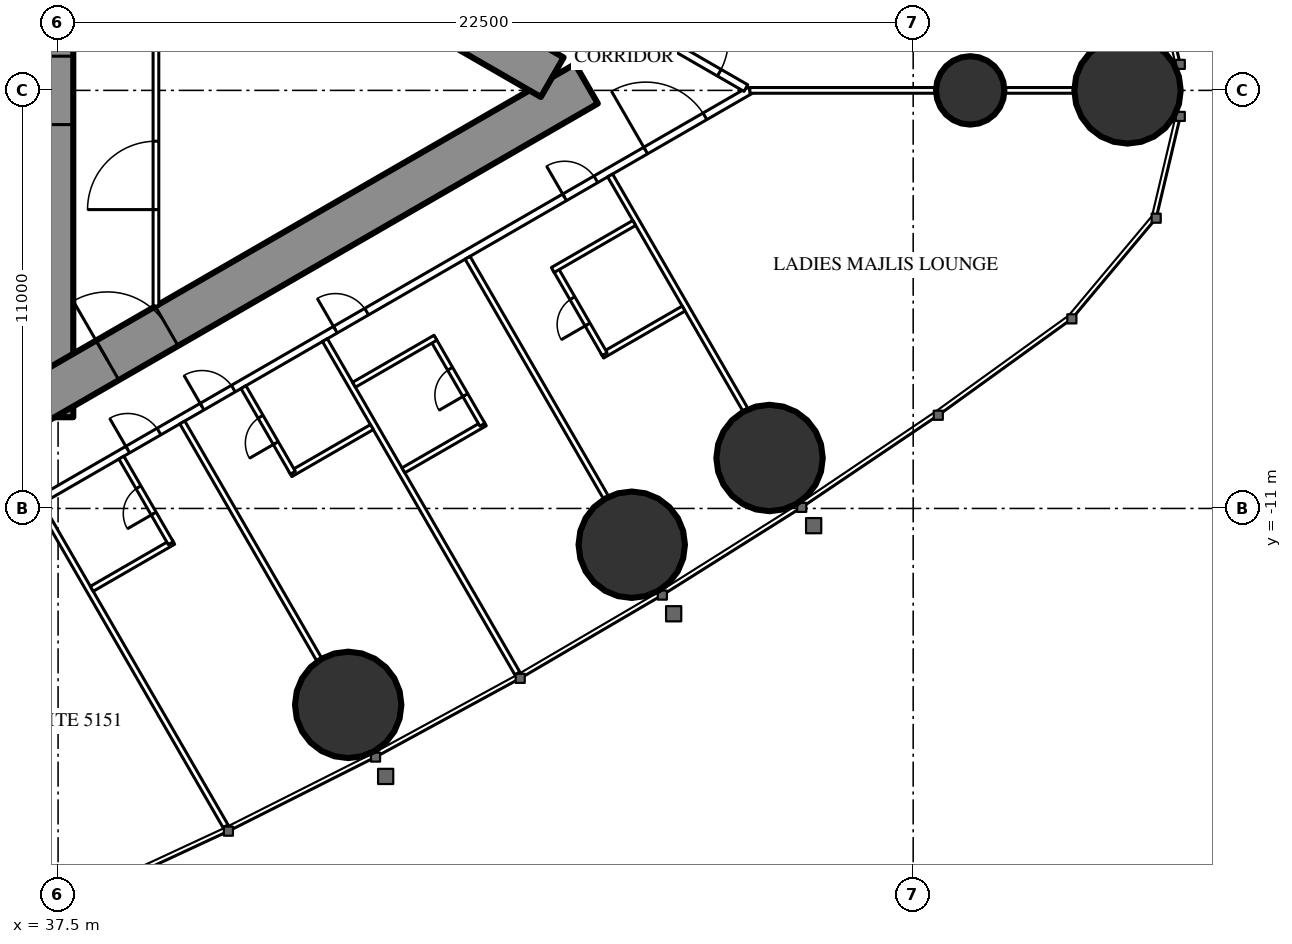
"""IFC4 building model, lengths in metres.
Left out: names, types, materials, properties, quantities, classifications, styles, units other than length and angle.
Written with IfcOpenShell. Run it as: python <this file> out.ifc"""

import sys

from ifc_helpers import new_model, si_unit, direction, frame, frame_2d, origin, origin_2d, place, context, subcontext, project, spatial, rectangle, circle, extrude, element, fill, save


model = new_model("IFC4")
c1 = context("Model", 3, precision=1e-05, world=origin(), true_north=direction((0.0, 1.0)))
c2 = subcontext(c1, "Body", "Model", "MODEL_VIEW")
j1 = project(units=[si_unit("LENGTHUNIT", "METRE"), si_unit("PLANEANGLEUNIT", "RADIAN")], contexts=[c1])
p1 = place(None, origin())
s1 = spatial("IfcSite", under=j1, at=p1, CompositionType="ELEMENT")
p2 = place(p1, origin())
s2 = spatial("IfcBuilding", under=s1, at=p2, CompositionType="ELEMENT")
p3 = place(p2, frame((0.0, 0.0, 191.3)))
s3 = spatial("IfcBuildingStorey", under=s2, at=p3, CompositionType="ELEMENT", Elevation=191.3)
for number, where, z_axis, x_axis in (
    (1, (65.64, 0.0, 0.0), (0.0, 0.0, 1.0), (1.0, 0.0, 0.0)),
    (2, (45.134, -16.168, 0.0), (0.0, 0.0, 1.0), (1.0, 0.0, 0.0)),
    (3, (52.594, -11.955, 0.0), (0.0, 0.0, 1.0), (1.0, 0.0, 0.0)),
    (4, (56.221, -9.672, 0.0), (0.0, 0.0, 1.0), (1.0, 0.0, 0.0)),
):
    element("IfcColumn", number, at=place(p3, frame(where, z_axis=z_axis, x_axis=x_axis)), inside=s3, PredefinedType="COLUMN", context=c2, shape_type="SweptSolid", body=[
        extrude(circle(Radius=1.4, at=origin_2d()), origin(), (0.0, 0.0, 1.0), 3.5),
    ])
p4 = place(p3, frame((61.5, 0.0, 0.0), z_axis=(0.0, 0.0, 1.0), x_axis=(1.0, 0.0, 0.0)))
e5 = element("IfcColumn", 5, at=p4, inside=s3, PredefinedType="COLUMN", context=c2, shape_type="SweptSolid", body=[
    extrude(circle(Radius=0.9, at=origin_2d()), origin(), (0.0, 0.0, 1.0), 3.5),
])
p5 = place(p3, frame((37.3, -8.6, 0.0), z_axis=(0.0, 0.0, 1.0), x_axis=(0.0, 1.0, 0.0)))
e6 = element("IfcWall", 6, at=p5, inside=s3, PredefinedType="SHEAR", context=c2, shape_type="SweptSolid", body=[
    extrude(rectangle(XDim=17.2, YDim=1.2, at=frame_2d((8.6, 0.0))), origin(), (0.0, 0.0, 1.0), 3.5),
])
p6 = place(p5, frame((7.7, 0.0, 0.0)))
e7 = element("IfcOpeningElement", 7, at=p6, cuts=e6, PredefinedType="OPENING", context=c2, shape_type="SweptSolid", body=[
    extrude(rectangle(XDim=1.8, YDim=2.2, at=frame_2d((0.9, 1.1))), frame((0.0, 0.61, 0.0), z_axis=(0.0, -1.0, 0.0), x_axis=(1.0, 0.0, 0.0)), (0.0, 0.0, 1.0), 1.22),
])
p7 = place(p3, frame((27.2, -13.8, 0.0), z_axis=(0.0, 0.0, 1.0), x_axis=(0.866027159892, 0.499996958321, 0.0)))
e8 = element("IfcWall", 8, at=p7, inside=s3, PredefinedType="SHEAR", context=c2, shape_type="SweptSolid", body=[
    extrude(rectangle(XDim=27.947, YDim=1.2, at=frame_2d((13.973, 0.0))), origin(), (0.0, 0.0, 1.0), 3.5),
])
p8 = place(p7, frame((4.6, 0.0, 0.0)))
e9 = element("IfcOpeningElement", 9, at=p8, cuts=e8, PredefinedType="OPENING", context=c2, shape_type="SweptSolid", body=[
    extrude(rectangle(XDim=1.0, YDim=2.2, at=frame_2d((0.5, 1.1))), frame((0.0, 0.61, 0.0), z_axis=(0.0, -1.0, 0.0), x_axis=(1.0, 0.0, 0.0)), (0.0, 0.0, 1.0), 1.22),
])
p9 = place(p7, frame((13.395, 0.0, 0.0)))
e10 = element("IfcOpeningElement", 10, at=p9, cuts=e8, PredefinedType="OPENING", context=c2, shape_type="SweptSolid", body=[
    extrude(rectangle(XDim=1.8, YDim=2.2, at=frame_2d((0.9, 1.1))), frame((0.0, 0.61, 0.0), z_axis=(0.0, -1.0, 0.0), x_axis=(1.0, 0.0, 0.0)), (0.0, 0.0, 1.0), 1.22),
])
p10 = place(p3, frame((27.2, 13.8, 0.0), z_axis=(0.0, 0.0, 1.0), x_axis=(0.866024515034, -0.500001539357, 0.0)))
e11 = element("IfcWall", 11, at=p10, inside=s3, PredefinedType="SHEAR", context=c2, shape_type="SweptSolid", body=[
    extrude(rectangle(XDim=26.907, YDim=1.2, at=frame_2d((13.454, 0.0))), origin(), (0.0, 0.0, 1.0), 3.5),
])
p11 = place(p10, frame((4.6, 0.0, 0.0)))
e12 = element("IfcOpeningElement", 12, at=p11, cuts=e11, PredefinedType="OPENING", context=c2, shape_type="SweptSolid", body=[
    extrude(rectangle(XDim=1.0, YDim=2.2, at=frame_2d((0.5, 1.1))), frame((0.0, 0.61, 0.0), z_axis=(0.0, -1.0, 0.0), x_axis=(1.0, 0.0, 0.0)), (0.0, 0.0, 1.0), 1.22),
])
p12 = place(p10, frame((13.395, 0.0, 0.0)))
e13 = element("IfcOpeningElement", 13, at=p12, cuts=e11, PredefinedType="OPENING", context=c2, shape_type="SweptSolid", body=[
    extrude(rectangle(XDim=1.8, YDim=2.2, at=frame_2d((0.9, 1.1))), frame((0.0, 0.61, 0.0), z_axis=(0.0, -1.0, 0.0), x_axis=(1.0, 0.0, 0.0)), (0.0, 0.0, 1.0), 1.22),
])
p13 = place(p3, frame((27.959, -16.017, 0.0), z_axis=(0.0, 0.0, 1.0), x_axis=(0.866024151371, 0.500002169237, 0.0)))
e14 = element("IfcWall", 14, at=p13, inside=s3, PredefinedType="PARTITIONING", context=c2, shape_type="SweptSolid", body=[
    extrude(rectangle(XDim=32.034, YDim=0.2, at=frame_2d((16.017, 0.0))), origin(), (0.0, 0.0, 1.0), 3.25),
])
p14 = place(p13, frame((0.6, 0.0, 0.0)))
e15 = element("IfcOpeningElement", 15, at=p14, cuts=e14, PredefinedType="OPENING", context=c2, shape_type="SweptSolid", body=[
    extrude(rectangle(XDim=0.95, YDim=2.2, at=frame_2d((0.475, 1.1))), frame((0.0, 0.11, 0.0), z_axis=(0.0, -1.0, 0.0), x_axis=(1.0, 0.0, 0.0)), (0.0, 0.0, 1.0), 0.22),
])
p15 = place(p13, frame((13.132, 0.0, 0.0)))
e16 = element("IfcOpeningElement", 16, at=p15, cuts=e14, PredefinedType="OPENING", context=c2, shape_type="SweptSolid", body=[
    extrude(rectangle(XDim=0.95, YDim=2.2, at=frame_2d((0.475, 1.1))), frame((0.0, 0.11, 0.0), z_axis=(0.0, -1.0, 0.0), x_axis=(1.0, 0.0, 0.0)), (0.0, 0.0, 1.0), 0.22),
])
p16 = place(p13, frame((15.391, 0.0, 0.0)))
e17 = element("IfcOpeningElement", 17, at=p16, cuts=e14, PredefinedType="OPENING", context=c2, shape_type="SweptSolid", body=[
    extrude(rectangle(XDim=0.95, YDim=2.2, at=frame_2d((0.475, 1.1))), frame((0.0, 0.11, 0.0), z_axis=(0.0, -1.0, 0.0), x_axis=(1.0, 0.0, 0.0)), (0.0, 0.0, 1.0), 0.22),
])
p17 = place(p13, frame((19.441, 0.0, 0.0)))
e18 = element("IfcOpeningElement", 18, at=p17, cuts=e14, PredefinedType="OPENING", context=c2, shape_type="SweptSolid", body=[
    extrude(rectangle(XDim=0.95, YDim=2.2, at=frame_2d((0.475, 1.1))), frame((0.0, 0.11, 0.0), z_axis=(0.0, -1.0, 0.0), x_axis=(1.0, 0.0, 0.0)), (0.0, 0.0, 1.0), 0.22),
])
p18 = place(p13, frame((26.406, 0.0, 0.0)))
e19 = element("IfcOpeningElement", 19, at=p18, cuts=e14, PredefinedType="OPENING", context=c2, shape_type="SweptSolid", body=[
    extrude(rectangle(XDim=0.95, YDim=2.2, at=frame_2d((0.475, 1.1))), frame((0.0, 0.11, 0.0), z_axis=(0.0, -1.0, 0.0), x_axis=(1.0, 0.0, 0.0)), (0.0, 0.0, 1.0), 0.22),
])
p19 = place(p13, frame((28.87, 0.0, 0.0)))
e20 = element("IfcOpeningElement", 20, at=p19, cuts=e14, PredefinedType="OPENING", context=c2, shape_type="SweptSolid", body=[
    extrude(rectangle(XDim=1.8, YDim=2.2, at=frame_2d((0.9, 1.1))), frame((0.0, 0.11, 0.0), z_axis=(0.0, -1.0, 0.0), x_axis=(1.0, 0.0, 0.0)), (0.0, 0.0, 1.0), 0.22),
])
p20 = place(p3, frame((37.022, -10.9, 0.0), z_axis=(0.0, 0.0, 1.0), x_axis=(0.499998620953, -0.866026199976, 0.0)))
e21 = element("IfcWall", 21, at=p20, inside=s3, PredefinedType="PARTITIONING", context=c2, shape_type="SweptSolid", body=[
    extrude(rectangle(XDim=9.77, YDim=0.15, at=frame_2d((4.885, 0.0))), origin(), (0.0, 0.0, 1.0), 3.25),
])
p21 = place(p3, frame((40.769, -8.737, 0.0), z_axis=(0.0, 0.0, 1.0), x_axis=(0.500013115284, -0.866017831539, 0.0)))
e22 = element("IfcWall", 22, at=p21, inside=s3, PredefinedType="PARTITIONING", context=c2, shape_type="SweptSolid", body=[
    extrude(rectangle(XDim=7.198, YDim=0.15, at=frame_2d((3.599, 0.0))), origin(), (0.0, 0.0, 1.0), 2.3),
])
p22 = place(p3, frame((44.521, -6.571, 0.0), z_axis=(0.0, 0.0, 1.0), x_axis=(0.500010457486, -0.866019366068, 0.0)))
e23 = element("IfcWall", 23, at=p22, inside=s3, PredefinedType="PARTITIONING", context=c2, shape_type="SweptSolid", body=[
    extrude(rectangle(XDim=10.126, YDim=0.15, at=frame_2d((5.063, 0.0))), origin(), (0.0, 0.0, 1.0), 3.25),
])
p23 = place(p3, frame((48.275, -4.404, 0.0), z_axis=(0.0, 0.0, 1.0), x_axis=(0.500006004368, -0.866021937133, 0.0)))
e24 = element("IfcWall", 24, at=p23, inside=s3, PredefinedType="PARTITIONING", context=c2, shape_type="SweptSolid", body=[
    extrude(rectangle(XDim=7.279, YDim=0.15, at=frame_2d((3.64, 0.0))), origin(), (0.0, 0.0, 1.0), 2.3),
])
p24 = place(p3, frame((52.025, -2.238, 0.0), z_axis=(0.0, 0.0, 1.0), x_axis=(0.499983785035, -0.866034765296, 0.0)))
e25 = element("IfcWall", 25, at=p24, inside=s3, PredefinedType="PARTITIONING", context=c2, shape_type="SweptSolid", body=[
    extrude(rectangle(XDim=7.116, YDim=0.15, at=frame_2d((3.558, 0.0))), origin(), (0.0, 0.0, 1.0), 2.3),
])
p25 = place(p3, frame((55.702, 0.0, 0.0), z_axis=(0.0, 0.0, 1.0), x_axis=(1.0, 0.0, 0.0)))
e26 = element("IfcWall", 26, at=p25, inside=s3, PredefinedType="PARTITIONING", context=c2, shape_type="SweptSolid", body=[
    extrude(rectangle(XDim=8.518, YDim=0.15, at=frame_2d((4.259, 0.0))), origin(), (0.0, 0.0, 1.0), 2.3),
])
p26 = place(p3, frame((52.639, 1.769, 0.0), z_axis=(0.0, 0.0, 1.0), x_axis=(0.866027340901, -0.4999966448, 0.0)))
e27 = element("IfcWall", 27, at=p26, inside=s3, PredefinedType="PARTITIONING", context=c2, shape_type="SweptSolid", body=[
    extrude(rectangle(XDim=3.417, YDim=0.2, at=frame_2d((1.708, 0.0))), origin(), (0.0, 0.0, 1.0), 3.25),
])
p27 = place(p26, frame((0.809, 0.0, 0.0)))
e28 = element("IfcOpeningElement", 28, at=p27, cuts=e27, PredefinedType="OPENING", context=c2, shape_type="SweptSolid", body=[
    extrude(rectangle(XDim=1.8, YDim=2.2, at=frame_2d((0.9, 1.1))), frame((0.0, 0.11, 0.0), z_axis=(0.0, -1.0, 0.0), x_axis=(1.0, 0.0, 0.0)), (0.0, 0.0, 1.0), 0.22),
])
p28 = place(p3, frame((38.387, -13.115, 0.0), z_axis=(0.0, 0.0, 1.0), x_axis=(0.866073894602, 0.499916002032, 0.0)))
e29 = element("IfcWall", 29, at=p28, inside=s3, PredefinedType="PARTITIONING", context=c2, shape_type="SweptSolid", body=[
    extrude(rectangle(XDim=2.475, YDim=0.15, at=frame_2d((1.238, 0.0))), origin(), (0.0, 0.0, 1.0), 3.25),
])
p29 = place(p3, frame((39.166, -9.663, 0.0), z_axis=(0.0, 0.0, 1.0), x_axis=(0.500006934395, -0.866021400173, 0.0)))
e30 = element("IfcWall", 30, at=p29, inside=s3, PredefinedType="PARTITIONING", context=c2, shape_type="SweptSolid", body=[
    extrude(rectangle(XDim=2.6, YDim=0.15, at=frame_2d((1.3, 0.0))), origin(), (0.0, 0.0, 1.0), 3.25),
])
p30 = place(p29, frame((0.9, 0.0, 0.0)))
e31 = element("IfcOpeningElement", 31, at=p30, cuts=e30, PredefinedType="OPENING", context=c2, shape_type="SweptSolid", body=[
    extrude(rectangle(XDim=0.8, YDim=2.2, at=frame_2d((0.4, 1.1))), frame((0.0, 0.085, 0.0), z_axis=(0.0, -1.0, 0.0), x_axis=(1.0, 0.0, 0.0)), (0.0, 0.0, 1.0), 0.17),
])
p31 = place(p3, frame((43.613, -10.097, 0.0), z_axis=(0.0, 0.0, 1.0), x_axis=(0.866031185235, 0.4999899861, 0.0)))
e32 = element("IfcWall", 32, at=p31, inside=s3, PredefinedType="PARTITIONING", context=c2, shape_type="SweptSolid", body=[
    extrude(rectangle(XDim=2.475, YDim=0.15, at=frame_2d((1.238, 0.0))), origin(), (0.0, 0.0, 1.0), 3.25),
])
p32 = place(p3, frame((42.378, -7.808, 0.0), z_axis=(0.0, 0.0, 1.0), x_axis=(0.500006934395, -0.866021400173, 0.0)))
e33 = element("IfcWall", 33, at=p32, inside=s3, PredefinedType="PARTITIONING", context=c2, shape_type="SweptSolid", body=[
    extrude(rectangle(XDim=2.6, YDim=0.15, at=frame_2d((1.3, 0.0))), origin(), (0.0, 0.0, 1.0), 3.25),
])
p33 = place(p32, frame((0.9, 0.0, 0.0)))
e34 = element("IfcOpeningElement", 34, at=p33, cuts=e33, PredefinedType="OPENING", context=c2, shape_type="SweptSolid", body=[
    extrude(rectangle(XDim=0.8, YDim=2.2, at=frame_2d((0.4, 1.1))), frame((0.0, 0.085, 0.0), z_axis=(0.0, -1.0, 0.0), x_axis=(1.0, 0.0, 0.0)), (0.0, 0.0, 1.0), 0.17),
])
p34 = place(p3, frame((46.586, -9.997, 0.0), z_axis=(0.0, 0.0, 1.0), x_axis=(0.866006523861, 0.500032699561, 0.0)))
e35 = element("IfcWall", 35, at=p34, inside=s3, PredefinedType="PARTITIONING", context=c2, shape_type="SweptSolid", body=[
    extrude(rectangle(XDim=2.475, YDim=0.15, at=frame_2d((1.237, 0.0))), origin(), (0.0, 0.0, 1.0), 3.25),
])
p35 = place(p3, frame((47.365, -6.546, 0.0), z_axis=(0.0, 0.0, 1.0), x_axis=(0.500006934395, -0.866021400173, 0.0)))
e36 = element("IfcWall", 36, at=p35, inside=s3, PredefinedType="PARTITIONING", context=c2, shape_type="SweptSolid", body=[
    extrude(rectangle(XDim=2.6, YDim=0.15, at=frame_2d((1.3, 0.0))), origin(), (0.0, 0.0, 1.0), 3.25),
])
p36 = place(p35, frame((0.9, 0.0, 0.0)))
e37 = element("IfcOpeningElement", 37, at=p36, cuts=e36, PredefinedType="OPENING", context=c2, shape_type="SweptSolid", body=[
    extrude(rectangle(XDim=0.8, YDim=2.2, at=frame_2d((0.4, 1.1))), frame((0.0, 0.085, 0.0), z_axis=(0.0, -1.0, 0.0), x_axis=(1.0, 0.0, 0.0)), (0.0, 0.0, 1.0), 0.17),
])
for number, where, z_axis, x_axis in (
    (38, (45.286, -7.746, 0.0), (0.0, 0.0, 1.0), (0.866, 0.5, 0.0)),
    (39, (51.817, -6.978, 0.0), (0.0, 0.0, 1.0), (0.866, 0.5, 0.0)),
):
    element("IfcWall", number, at=place(p3, frame(where, z_axis=z_axis, x_axis=x_axis)), inside=s3, PredefinedType="PARTITIONING", context=c2, shape_type="SweptSolid", body=[
        extrude(rectangle(XDim=2.475, YDim=0.15, at=frame_2d((1.237, 0.0))), origin(), (0.0, 0.0, 1.0), 3.25),
    ])
p37 = place(p3, frame((50.582, -4.688, 0.0), z_axis=(0.0, 0.0, 1.0), x_axis=(0.500006934395, -0.866021400173, 0.0)))
e40 = element("IfcWall", 40, at=p37, inside=s3, PredefinedType="PARTITIONING", context=c2, shape_type="SweptSolid", body=[
    extrude(rectangle(XDim=2.6, YDim=0.15, at=frame_2d((1.3, 0.0))), origin(), (0.0, 0.0, 1.0), 3.25),
])
p38 = place(p37, frame((0.9, 0.0, 0.0)))
e41 = element("IfcOpeningElement", 41, at=p38, cuts=e40, PredefinedType="OPENING", context=c2, shape_type="SweptSolid", body=[
    extrude(rectangle(XDim=0.8, YDim=2.2, at=frame_2d((0.4, 1.1))), frame((0.0, 0.085, 0.0), z_axis=(0.0, -1.0, 0.0), x_axis=(1.0, 0.0, 0.0)), (0.0, 0.0, 1.0), 0.17),
])
p39 = place(p3, frame((50.517, -4.726, 0.0), z_axis=(0.0, 0.0, 1.0), x_axis=(0.866031185235, 0.4999899861, 0.0)))
e42 = element("IfcWall", 42, at=p39, inside=s3, PredefinedType="PARTITIONING", context=c2, shape_type="SweptSolid", body=[
    extrude(rectangle(XDim=2.475, YDim=0.15, at=frame_2d((1.238, 0.0))), origin(), (0.0, 0.0, 1.0), 3.25),
])
p40 = place(p3, frame((40.075, -5.674, 0.0), z_axis=(0.0, 0.0, 1.0), x_axis=(0.0, 1.0, 0.0)))
e43 = element("IfcWall", 43, at=p40, inside=s3, PredefinedType="PARTITIONING", context=c2, shape_type="SweptSolid", body=[
    extrude(rectangle(XDim=6.874, YDim=0.15, at=frame_2d((3.437, 0.0))), origin(), (0.0, 0.0, 1.0), 3.25),
])
p41 = place(p40, frame((2.537, 0.0, 0.0)))
e44 = element("IfcOpeningElement", 44, at=p41, cuts=e43, PredefinedType="OPENING", context=c2, shape_type="SweptSolid", body=[
    extrude(rectangle(XDim=1.8, YDim=2.2, at=frame_2d((0.9, 1.1))), frame((0.0, 0.085, 0.0), z_axis=(0.0, -1.0, 0.0), x_axis=(1.0, 0.0, 0.0)), (0.0, 0.0, 1.0), 0.17),
])
p42 = place(p30, origin())
e45 = element("IfcDoor", 45, at=p42, inside=s3, OperationType="SINGLE_SWING_RIGHT", PredefinedType="DOOR", context=c2, shape_type="SweptSolid", body=[
    extrude(rectangle(XDim=0.8, YDim=2.2, at=frame_2d((0.4, 1.1))), frame((0.0, 0.025, 0.0), z_axis=(0.0, -1.0, 0.0), x_axis=(1.0, 0.0, 0.0)), (0.0, 0.0, 1.0), 0.05),
])
fill(e31, e45)
p43 = place(p15, origin())
e46 = element("IfcDoor", 46, at=p43, inside=s3, OperationType="SINGLE_SWING_LEFT", PredefinedType="DOOR", context=c2, shape_type="SweptSolid", body=[
    extrude(rectangle(XDim=0.95, YDim=2.2, at=frame_2d((0.475, 1.1))), frame((0.0, 0.025, 0.0), z_axis=(0.0, -1.0, 0.0), x_axis=(1.0, 0.0, 0.0)), (0.0, 0.0, 1.0), 0.05),
])
fill(e16, e46)
p44 = place(p33, origin())
e47 = element("IfcDoor", 47, at=p44, inside=s3, OperationType="SINGLE_SWING_RIGHT", PredefinedType="DOOR", context=c2, shape_type="SweptSolid", body=[
    extrude(rectangle(XDim=0.8, YDim=2.2, at=frame_2d((0.4, 1.1))), frame((0.0, 0.025, 0.0), z_axis=(0.0, -1.0, 0.0), x_axis=(1.0, 0.0, 0.0)), (0.0, 0.0, 1.0), 0.05),
])
fill(e34, e47)
p45 = place(p16, origin())
e48 = element("IfcDoor", 48, at=p45, inside=s3, OperationType="SINGLE_SWING_LEFT", PredefinedType="DOOR", context=c2, shape_type="SweptSolid", body=[
    extrude(rectangle(XDim=0.95, YDim=2.2, at=frame_2d((0.475, 1.1))), frame((0.0, 0.025, 0.0), z_axis=(0.0, -1.0, 0.0), x_axis=(1.0, 0.0, 0.0)), (0.0, 0.0, 1.0), 0.05),
])
fill(e17, e48)
p46 = place(p36, origin())
e49 = element("IfcDoor", 49, at=p46, inside=s3, OperationType="SINGLE_SWING_RIGHT", PredefinedType="DOOR", context=c2, shape_type="SweptSolid", body=[
    extrude(rectangle(XDim=0.8, YDim=2.2, at=frame_2d((0.4, 1.1))), frame((0.0, 0.025, 0.0), z_axis=(0.0, -1.0, 0.0), x_axis=(1.0, 0.0, 0.0)), (0.0, 0.0, 1.0), 0.05),
])
fill(e37, e49)
p47 = place(p17, origin())
e50 = element("IfcDoor", 50, at=p47, inside=s3, OperationType="SINGLE_SWING_LEFT", PredefinedType="DOOR", context=c2, shape_type="SweptSolid", body=[
    extrude(rectangle(XDim=0.95, YDim=2.2, at=frame_2d((0.475, 1.1))), frame((0.0, 0.025, 0.0), z_axis=(0.0, -1.0, 0.0), x_axis=(1.0, 0.0, 0.0)), (0.0, 0.0, 1.0), 0.05),
])
fill(e18, e50)
p48 = place(p38, origin())
e51 = element("IfcDoor", 51, at=p48, inside=s3, OperationType="SINGLE_SWING_RIGHT", PredefinedType="DOOR", context=c2, shape_type="SweptSolid", body=[
    extrude(rectangle(XDim=0.8, YDim=2.2, at=frame_2d((0.4, 1.1))), frame((0.0, 0.025, 0.0), z_axis=(0.0, -1.0, 0.0), x_axis=(1.0, 0.0, 0.0)), (0.0, 0.0, 1.0), 0.05),
])
fill(e41, e51)
p49 = place(p18, origin())
e52 = element("IfcDoor", 52, at=p49, inside=s3, OperationType="SINGLE_SWING_LEFT", PredefinedType="DOOR", context=c2, shape_type="SweptSolid", body=[
    extrude(rectangle(XDim=0.95, YDim=2.2, at=frame_2d((0.475, 1.1))), frame((0.0, 0.025, 0.0), z_axis=(0.0, -1.0, 0.0), x_axis=(1.0, 0.0, 0.0)), (0.0, 0.0, 1.0), 0.05),
])
fill(e19, e52)
p50 = place(p19, origin())
e53 = element("IfcDoor", 53, at=p50, inside=s3, OperationType="DOUBLE_DOOR_SINGLE_SWING", PredefinedType="DOOR", context=c2, shape_type="SweptSolid", body=[
    extrude(rectangle(XDim=1.8, YDim=2.2, at=frame_2d((0.9, 1.1))), frame((0.0, 0.025, 0.0), z_axis=(0.0, -1.0, 0.0), x_axis=(1.0, 0.0, 0.0)), (0.0, 0.0, 1.0), 0.05),
])
fill(e20, e53)
p51 = place(p27, origin())
e54 = element("IfcDoor", 54, at=p51, inside=s3, OperationType="DOUBLE_DOOR_SINGLE_SWING", PredefinedType="DOOR", context=c2, shape_type="SweptSolid", body=[
    extrude(rectangle(XDim=1.8, YDim=2.2, at=frame_2d((0.9, 1.1))), frame((0.0, 0.025, 0.0), z_axis=(0.0, -1.0, 0.0), x_axis=(1.0, 0.0, 0.0)), (0.0, 0.0, 1.0), 0.05),
])
fill(e28, e54)
p52 = place(p41, origin())
e55 = element("IfcDoor", 55, at=p52, inside=s3, OperationType="DOUBLE_DOOR_SINGLE_SWING", PredefinedType="DOOR", context=c2, shape_type="SweptSolid", body=[
    extrude(rectangle(XDim=1.8, YDim=2.2, at=frame_2d((0.9, 1.1))), frame((0.0, 0.025, 0.0), z_axis=(0.0, -1.0, 0.0), x_axis=(1.0, 0.0, 0.0)), (0.0, 0.0, 1.0), 0.05),
])
fill(e44, e55)
p53 = place(p9, origin())
e56 = element("IfcDoor", 56, at=p53, inside=s3, OperationType="DOUBLE_DOOR_SINGLE_SWING", PredefinedType="DOOR", context=c2, shape_type="SweptSolid", body=[
    extrude(rectangle(XDim=1.8, YDim=2.2, at=frame_2d((0.9, 1.1))), frame((0.0, 0.025, 0.0), z_axis=(0.0, -1.0, 0.0), x_axis=(1.0, 0.0, 0.0)), (0.0, 0.0, 1.0), 0.05),
])
fill(e10, e56)
save(model, sys.argv[1])
